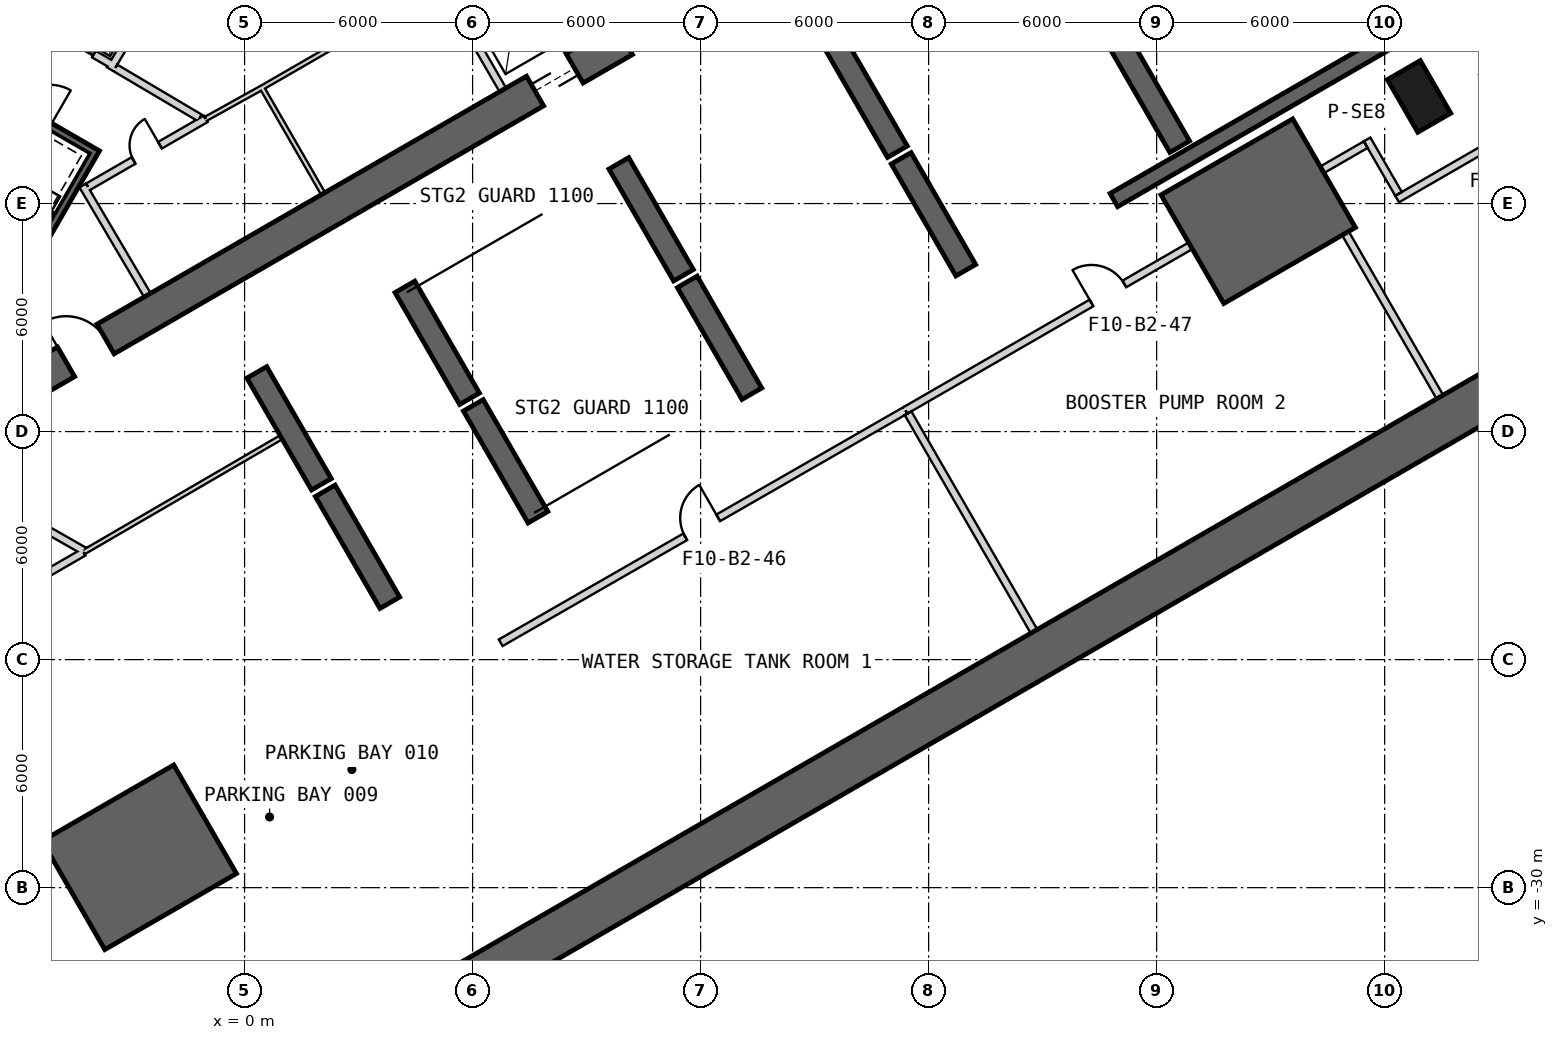
"""IFC4 building model, lengths in metres.
Left out: names, types, materials, properties, quantities, classifications, styles, units other than length and angle.
Written with IfcOpenShell. Run it as: python <this file> out.ifc"""

import sys

from ifc_helpers import new_model, si_unit, direction, frame, frame_2d, origin, origin_2d, place, context, subcontext, project, spatial, polyline, rectangle, outline, extrude, element, fill, save


model = new_model("IFC4")
c1 = context("Model", 3, precision=1e-05, world=origin(), true_north=direction((0.0, 1.0)))
c2 = subcontext(c1, "Body", "Model", "MODEL_VIEW")
j1 = project(units=[si_unit("LENGTHUNIT", "METRE"), si_unit("PLANEANGLEUNIT", "RADIAN")], contexts=[c1])
p1 = place(None, origin())
s1 = spatial("IfcSite", under=j1, at=p1, CompositionType="ELEMENT")
p2 = place(p1, origin())
s2 = spatial("IfcBuilding", under=s1, at=p2, CompositionType="ELEMENT")
p3 = place(p2, frame((0.0, 0.0, -11.0)))
s3 = spatial("IfcBuildingStorey", under=s2, at=p3, CompositionType="ELEMENT", Elevation=-11.0)
p4 = place(p3, frame((33.458, -16.625, -0.4), z_axis=(0.0, 0.0, 1.0), x_axis=(-0.865989988988, -0.500061335211, 0.0)))
e1 = element("IfcWall", 1, at=p4, inside=s3, PredefinedType="SHEAR", context=c2, shape_type="SweptSolid", body=[
    extrude(rectangle(XDim=41.324, YDim=1.2, at=frame_2d((20.662, 0.0))), origin(), (0.0, 0.0, 1.0), 5.9),
])
p5 = place(p3, frame((30.905, -9.181, -0.4), z_axis=(0.0, 0.0, 1.0), x_axis=(0.5, -0.866025403784, 0.0)))
e2 = element("IfcColumn", 2, at=p5, inside=s3, PredefinedType="COLUMN", context=c2, shape_type="SweptSolid", body=[
    extrude(rectangle(XDim=1.6, YDim=1.0, at=origin_2d()), origin(), (0.0, 0.0, 1.0), 5.9),
])
p6 = place(p3, frame((-7.825, -17.97, -0.4), z_axis=(0.0, 0.0, 1.0), x_axis=(0.866028369851, 0.499994862586, 0.0)))
e3 = element("IfcWall", 3, at=p6, inside=s3, PredefinedType="SHEAR", context=c2, shape_type="SweptSolid", body=[
    extrude(rectangle(XDim=31.523, YDim=0.9, at=frame_2d((15.762, 0.0))), origin(), (0.0, 0.0, 1.0), 5.9),
])
p7 = place(p6, frame((17.862, 0.0, 0.4)))
e4 = element("IfcOpeningElement", 4, at=p7, cuts=e3, PredefinedType="OPENING", context=c2, shape_type="SweptSolid", body=[
    extrude(rectangle(XDim=1.2, YDim=2.4, at=frame_2d((0.6, 1.2))), frame((0.0, 0.46, 0.0), z_axis=(0.0, -1.0, 0.0), x_axis=(1.0, 0.0, 0.0)), (0.0, 0.0, 1.0), 0.92),
])
p8 = place(p6, frame((20.562, 0.0, 0.4)))
e5 = element("IfcOpeningElement", 5, at=p8, cuts=e3, PredefinedType="OPENING", context=c2, shape_type="SweptSolid", body=[
    extrude(rectangle(XDim=1.2, YDim=2.4, at=frame_2d((0.6, 1.2))), frame((0.0, 0.46, 0.0), z_axis=(0.0, -1.0, 0.0), x_axis=(1.0, 0.0, 0.0)), (0.0, 0.0, 1.0), 0.92),
])
p9 = place(p6, frame((26.712, 0.0, 0.4)))
e6 = element("IfcOpeningElement", 6, at=p9, cuts=e3, PredefinedType="OPENING", context=c2, shape_type="SweptSolid", body=[
    extrude(rectangle(XDim=1.2, YDim=2.4, at=frame_2d((0.6, 1.2))), frame((0.0, 0.46, 0.0), z_axis=(0.0, -1.0, 0.0), x_axis=(1.0, 0.0, 0.0)), (0.0, 0.0, 1.0), 0.92),
])
p10 = place(p6, frame((3.612, 0.0, 0.4)))
e7 = element("IfcOpeningElement", 7, at=p10, cuts=e3, PredefinedType="OPENING", context=c2, shape_type="SweptSolid", body=[
    extrude(rectangle(XDim=1.2, YDim=2.4, at=frame_2d((0.6, 1.2))), frame((0.0, 0.46, 0.0), z_axis=(0.0, -1.0, 0.0), x_axis=(1.0, 0.0, 0.0)), (0.0, 0.0, 1.0), 0.92),
])
p11 = place(p3, frame((15.478, -7.692, -0.4), z_axis=(0.0, 0.0, 1.0), x_axis=(0.499977295307, -0.866038511948, 0.0)))
e8 = element("IfcWall", 8, at=p11, inside=s3, PredefinedType="STANDARD", context=c2, shape_type="SweptSolid", body=[
    extrude(rectangle(XDim=3.4, YDim=0.6, at=frame_2d((1.7, 0.0))), origin(), (0.0, 0.0, 1.0), 3.164),
])
p12 = place(p3, frame((9.848, -10.942, -0.4), z_axis=(0.0, 0.0, 1.0), x_axis=(0.499977295307, -0.866038511948, 0.0)))
e9 = element("IfcWall", 9, at=p12, inside=s3, PredefinedType="STANDARD", context=c2, shape_type="SweptSolid", body=[
    extrude(rectangle(XDim=3.4, YDim=0.6, at=frame_2d((1.7, 0.0))), origin(), (0.0, 0.0, 1.0), 4.093),
])
p13 = place(p3, frame((4.219, -14.192, -0.4), z_axis=(0.0, 0.0, 1.0), x_axis=(0.499977295307, -0.866038511948, 0.0)))
e10 = element("IfcWall", 10, at=p13, inside=s3, PredefinedType="STANDARD", context=c2, shape_type="SweptSolid", body=[
    extrude(rectangle(XDim=3.4, YDim=0.6, at=frame_2d((1.7, 0.0))), origin(), (0.0, 0.0, 1.0), 5.021),
])
p14 = place(p3, frame((0.322, -16.442, -0.4), z_axis=(0.0, 0.0, 1.0), x_axis=(0.500062241894, -0.865989465428, 0.0)))
e11 = element("IfcWall", 11, at=p14, inside=s3, PredefinedType="STANDARD", context=c2, shape_type="SweptSolid", body=[
    extrude(rectangle(XDim=3.4, YDim=0.6, at=frame_2d((1.7, 0.0))), origin(), (0.0, 0.0, 1.0), 5.45),
])
p15 = place(p3, frame((22.907, -7.559, -0.4), z_axis=(0.0, 0.0, 1.0), x_axis=(0.499977295307, -0.866038511948, 0.0)))
e12 = element("IfcWall", 12, at=p15, inside=s3, PredefinedType="STANDARD", context=c2, shape_type="SweptSolid", body=[
    extrude(rectangle(XDim=3.4, YDim=0.6, at=frame_2d((1.7, 0.0))), origin(), (0.0, 0.0, 1.0), 2.236),
])
p16 = place(p3, frame((17.278, -10.809, -0.4), z_axis=(0.0, 0.0, 1.0), x_axis=(0.499977295307, -0.866038511948, 0.0)))
e13 = element("IfcWall", 13, at=p16, inside=s3, PredefinedType="STANDARD", context=c2, shape_type="SweptSolid", body=[
    extrude(rectangle(XDim=3.4, YDim=0.6, at=frame_2d((1.7, 0.0))), origin(), (0.0, 0.0, 1.0), 3.164),
])
p17 = place(p3, frame((11.648, -14.059, -0.4), z_axis=(0.0, 0.0, 1.0), x_axis=(0.499977295307, -0.866038511948, 0.0)))
e14 = element("IfcWall", 14, at=p17, inside=s3, PredefinedType="STANDARD", context=c2, shape_type="SweptSolid", body=[
    extrude(rectangle(XDim=3.4, YDim=0.6, at=frame_2d((1.7, 0.0))), origin(), (0.0, 0.0, 1.0), 4.093),
])
p18 = place(p3, frame((6.019, -17.309, -0.4), z_axis=(0.0, 0.0, 1.0), x_axis=(0.499977295307, -0.866038511948, 0.0)))
e15 = element("IfcWall", 15, at=p18, inside=s3, PredefinedType="STANDARD", context=c2, shape_type="SweptSolid", body=[
    extrude(rectangle(XDim=3.4, YDim=0.6, at=frame_2d((1.7, 0.0))), origin(), (0.0, 0.0, 1.0), 5.021),
])
p19 = place(p3, frame((2.122, -19.559, -0.4), z_axis=(0.0, 0.0, 1.0), x_axis=(0.499977295307, -0.866038511948, 0.0)))
e16 = element("IfcWall", 16, at=p19, inside=s3, PredefinedType="STANDARD", context=c2, shape_type="SweptSolid", body=[
    extrude(rectangle(XDim=3.4, YDim=0.6, at=frame_2d((1.7, 0.0))), origin(), (0.0, 0.0, 1.0), 5.45),
])
p20 = place(p3, frame((22.875, -11.908, -0.4), z_axis=(0.0, 0.0, 1.0), x_axis=(0.866022361258, 0.500005269773, 0.0)))
e17 = element("IfcWall", 17, at=p20, inside=s3, PredefinedType="SHEAR", context=c2, shape_type="SweptSolid", body=[
    extrude(rectangle(XDim=19.702, YDim=0.4, at=frame_2d((9.851, 0.0))), origin(), (0.0, 0.0, 1.0), 5.5),
])
p21 = place(p3, frame((0.0, 0.0, -0.4)))
e18 = element("IfcWall", 18, at=p21, inside=s3, PredefinedType="SHEAR", context=c2, shape_type="SweptSolid", body=[
    extrude(outline(polyline([(-3.678, -31.63), (-0.214, -29.63), (-1.864, -26.772), (-5.328, -28.772), (-3.678, -31.63)])), origin(), (0.0, 0.0, 1.0), 5.9),
])
p22 = place(p3, frame((0.0, 0.0, -0.4)))
e19 = element("IfcWall", 19, at=p22, inside=s3, PredefinedType="SHEAR", context=c2, shape_type="SweptSolid", body=[
    extrude(outline(polyline([(25.767, -14.63), (29.231, -12.63), (27.581, -9.772), (24.117, -11.772), (25.767, -14.63)])), origin(), (0.0, 0.0, 1.0), 5.9),
])
p23 = place(p3, frame((6.795, -9.01, 0.0), z_axis=(0.0, 0.0, 1.0), x_axis=(-0.499984717929, 0.866034226713, 0.0)))
e20 = element("IfcWall", 20, at=p23, inside=s3, PredefinedType="PLUMBINGWALL", context=c2, shape_type="SweptSolid", body=[
    extrude(rectangle(XDim=3.25, YDim=0.2, at=frame_2d((1.625, 0.0))), origin(), (0.0, 0.0, 1.0), 5.1),
])
p24 = place(p3, frame((-3.905, -10.563, -0.4), z_axis=(0.0, 0.0, 1.0), x_axis=(-0.500012932018, -0.866017937352, 0.0)))
e21 = element("IfcWall", 21, at=p24, inside=s3, PredefinedType="SHEAR", context=c2, shape_type="SweptSolid", body=[
    extrude(rectangle(XDim=8.1, YDim=0.2, at=frame_2d((4.05, 0.0))), origin(), (0.0, 0.0, 1.0), 5.5),
])
p25 = place(p3, frame((-4.041, -10.599, -0.4), z_axis=(0.0, 0.0, 1.0), x_axis=(-0.866047807691, 0.499961193289, 0.0)))
e22 = element("IfcWall", 22, at=p25, inside=s3, PredefinedType="SHEAR", context=c2, shape_type="SweptSolid", body=[
    extrude(rectangle(XDim=3.6, YDim=0.2, at=frame_2d((1.8, 0.0))), origin(), (0.0, 0.0, 1.0), 5.5),
])
p26 = place(p25, frame((1.25, 0.0, 0.4)))
e23 = element("IfcOpeningElement", 23, at=p26, cuts=e22, PredefinedType="OPENING", context=c2, shape_type="SweptSolid", body=[
    extrude(rectangle(XDim=1.1, YDim=2.1, at=frame_2d((0.55, 1.05))), frame((0.0, 0.11, 0.0), z_axis=(0.0, -1.0, 0.0), x_axis=(1.0, 0.0, 0.0)), (0.0, 0.0, 1.0), 0.22),
])
p27 = place(p3, frame((-3.446, -8.368, 0.0), z_axis=(0.0, 0.0, 1.0), x_axis=(-0.866024647952, 0.500001309137, 0.0)))
e24 = element("IfcWall", 24, at=p27, inside=s3, PredefinedType="PLUMBINGWALL", context=c2, shape_type="SweptSolid", body=[
    extrude(rectangle(XDim=2.4, YDim=0.2, at=frame_2d((1.2, 0.0))), origin(), (0.0, 0.0, 1.0), 5.1),
])
p28 = place(p27, frame((0.6, 0.0, 0.0)))
e25 = element("IfcOpeningElement", 25, at=p28, cuts=e24, PredefinedType="OPENING", context=c2, shape_type="SweptSolid", body=[
    extrude(rectangle(XDim=1.2, YDim=2.4, at=frame_2d((0.6, 1.2))), frame((0.0, 0.11, 0.0), z_axis=(0.0, -1.0, 0.0), x_axis=(1.0, 0.0, 0.0)), (0.0, 0.0, 1.0), 0.22),
])
p29 = place(p3, frame((-1.91, -5.71, 0.0), z_axis=(0.0, 0.0, 1.0), x_axis=(-0.508616218331, -0.860993346345, 0.0)))
e26 = element("IfcWall", 26, at=p29, inside=s3, PredefinedType="PLUMBINGWALL", context=c2, shape_type="SweptSolid", body=[
    extrude(rectangle(XDim=3.2, YDim=0.2, at=frame_2d((1.6, 0.0))), origin(), (0.0, 0.0, 1.0), 5.1),
])
p30 = place(p3, frame((2.067, -11.74, 0.0), z_axis=(0.0, 0.0, 1.0), x_axis=(-0.499984717929, 0.866034226713, 0.0)))
e27 = element("IfcWall", 27, at=p30, inside=s3, PredefinedType="PARTITIONING", context=c2, shape_type="SweptSolid", body=[
    extrude(rectangle(XDim=3.25, YDim=0.12, at=frame_2d((1.625, 0.0))), origin(), (0.0, 0.0, 1.0), 5.1),
])
p31 = place(p3, frame((-4.26, -11.524, 0.0), z_axis=(0.0, 0.0, 1.0), x_axis=(0.507997497166, -0.861358544901, 0.0)))
e28 = element("IfcWall", 28, at=p31, inside=s3, PredefinedType="PARTITIONING", context=c2, shape_type="SweptSolid", body=[
    extrude(rectangle(XDim=3.35, YDim=0.2, at=frame_2d((1.675, 0.0))), origin(), (0.0, 0.0, 1.0), 5.1),
])
p32 = place(p3, frame((-1.024, -9.771, 0.0), z_axis=(0.0, 0.0, 1.0), x_axis=(-0.866029903013, -0.499992207027, 0.0)))
e29 = element("IfcWall", 29, at=p32, inside=s3, PredefinedType="PARTITIONING", context=c2, shape_type="SweptSolid", body=[
    extrude(rectangle(XDim=3.578, YDim=0.2, at=frame_2d((1.789, 0.0))), origin(), (0.0, 0.0, 1.0), 5.1),
])
p33 = place(p32, frame((1.389, 0.0, 0.0)))
e30 = element("IfcOpeningElement", 30, at=p33, cuts=e29, PredefinedType="OPENING", context=c2, shape_type="SweptSolid", body=[
    extrude(rectangle(XDim=0.8, YDim=2.1, at=frame_2d((0.4, 1.05))), frame((0.0, 0.11, 0.0), z_axis=(0.0, -1.0, 0.0), x_axis=(1.0, 0.0, 0.0)), (0.0, 0.0, 1.0), 0.22),
])
p34 = place(p3, frame((-1.023, -9.772, 0.0), z_axis=(0.0, 0.0, 1.0), x_axis=(0.874290944206, 0.485402250592, 0.0)))
e31 = element("IfcWall", 31, at=p34, inside=s3, PredefinedType="PARTITIONING", context=c2, shape_type="SweptSolid", body=[
    extrude(rectangle(XDim=1.723, YDim=0.12, at=frame_2d((0.861, 0.0))), origin(), (0.0, 0.0, 1.0), 5.1),
])
p35 = place(p3, frame((0.483, -8.936, 0.0), z_axis=(0.0, 0.0, 1.0), x_axis=(0.866028230842, 0.499995103361, 0.0)))
e32 = element("IfcWall", 32, at=p35, inside=s3, PredefinedType="PARTITIONING", context=c2, shape_type="SweptSolid", body=[
    extrude(rectangle(XDim=5.4, YDim=0.12, at=frame_2d((2.7, 0.0))), origin(), (0.0, 0.0, 1.0), 5.1),
])
p36 = place(p35, frame((2.3, 0.0, 0.0)))
e33 = element("IfcOpeningElement", 33, at=p36, cuts=e32, PredefinedType="OPENING", context=c2, shape_type="SweptSolid", body=[
    extrude(rectangle(XDim=0.8, YDim=2.1, at=frame_2d((0.4, 1.05))), frame((0.0, 0.07, 0.0), z_axis=(0.0, -1.0, 0.0), x_axis=(1.0, 0.0, 0.0)), (0.0, 0.0, 1.0), 0.14),
])
p37 = place(p3, frame((-3.401, -8.43, 0.0), z_axis=(0.0, 0.0, 1.0), x_axis=(0.860630814782, -0.509229418482, 0.0)))
e34 = element("IfcWall", 34, at=p37, inside=s3, PredefinedType="PARTITIONING", context=c2, shape_type="SweptSolid", body=[
    extrude(rectangle(XDim=2.582, YDim=0.2, at=frame_2d((1.291, 0.0))), origin(), (0.0, 0.0, 1.0), 5.1),
])
p38 = place(p3, frame((-4.236, -21.175, 0.0), z_axis=(0.0, 0.0, 1.0), x_axis=(0.864433297723, 0.502747524895, 0.0)))
e35 = element("IfcWall", 35, at=p38, inside=s3, PredefinedType="PARTITIONING", context=c2, shape_type="SweptSolid", body=[
    extrude(rectangle(XDim=6.244, YDim=0.12, at=frame_2d((3.122, 0.0))), origin(), (0.0, 0.0, 1.0), 4.68),
])
p39 = place(p3, frame((-11.05, -25.109, 0.0), z_axis=(0.0, 0.0, 1.0), x_axis=(0.866021255939, 0.50000718421, 0.0)))
e36 = element("IfcWall", 36, at=p39, inside=s3, PredefinedType="PARTITIONING", context=c2, shape_type="SweptSolid", body=[
    extrude(rectangle(XDim=7.868, YDim=0.2, at=frame_2d((3.934, 0.0))), origin(), (0.0, 0.0, 1.0), 4.18),
])
p40 = place(p39, frame((3.462, 0.0, 0.0)))
e37 = element("IfcOpeningElement", 37, at=p40, cuts=e36, PredefinedType="OPENING", context=c2, shape_type="SweptSolid", body=[
    extrude(rectangle(XDim=1.0, YDim=2.1, at=frame_2d((0.5, 1.05))), frame((0.0, 0.11, 0.0), z_axis=(0.0, -1.0, 0.0), x_axis=(1.0, 0.0, 0.0)), (0.0, 0.0, 1.0), 0.22),
])
p41 = place(p3, frame((-8.707, -18.583, 0.0), z_axis=(0.0, 0.0, 1.0), x_axis=(0.868530929613, -0.495634970825, 0.0)))
e38 = element("IfcWall", 38, at=p41, inside=s3, PredefinedType="PARTITIONING", context=c2, shape_type="SweptSolid", body=[
    extrude(rectangle(XDim=5.166, YDim=0.2, at=frame_2d((2.583, 0.0))), origin(), (0.0, 0.0, 1.0), 4.18),
])
p42 = place(p3, frame((6.739, -23.556, 0.0), z_axis=(0.0, 0.0, 1.0), x_axis=(0.867232277188, 0.497903783279, 0.0)))
e39 = element("IfcWall", 39, at=p42, inside=s3, PredefinedType="PARTITIONING", context=c2, shape_type="SweptSolid", body=[
    extrude(rectangle(XDim=12.283, YDim=0.2, at=frame_2d((6.142, 0.0))), origin(), (0.0, 0.0, 1.0), 5.1),
])
p43 = place(p42, frame((5.6, 0.0, 0.0)))
e40 = element("IfcOpeningElement", 40, at=p43, cuts=e39, PredefinedType="OPENING", context=c2, shape_type="SweptSolid", body=[
    extrude(rectangle(XDim=1.0, YDim=2.1, at=frame_2d((0.5, 1.05))), frame((0.0, 0.11, 0.0), z_axis=(0.0, -1.0, 0.0), x_axis=(1.0, 0.0, 0.0)), (0.0, 0.0, 1.0), 0.22),
])
p44 = place(p3, frame((17.392, -17.441, 0.0), z_axis=(0.0, 0.0, 1.0), x_axis=(0.866022182542, 0.500005579313, 0.0)))
e41 = element("IfcWall", 41, at=p44, inside=s3, PredefinedType="PARTITIONING", context=c2, shape_type="SweptSolid", body=[
    extrude(rectangle(XDim=8.659, YDim=0.2, at=frame_2d((4.329, 0.0))), origin(), (0.0, 0.0, 1.0), 5.1),
])
p45 = place(p44, frame((5.65, 0.0, 0.0)))
e42 = element("IfcOpeningElement", 42, at=p45, cuts=e41, PredefinedType="OPENING", context=c2, shape_type="SweptSolid", body=[
    extrude(rectangle(XDim=1.0, YDim=2.1, at=frame_2d((0.5, 1.05))), frame((0.0, 0.11, 0.0), z_axis=(0.0, -1.0, 0.0), x_axis=(1.0, 0.0, 0.0)), (0.0, 0.0, 1.0), 0.22),
])
p46 = place(p3, frame((28.354, -11.111, 0.0), z_axis=(0.0, 0.0, 1.0), x_axis=(0.866056658381, 0.499945861543, 0.0)))
e43 = element("IfcWall", 43, at=p46, inside=s3, PredefinedType="PARTITIONING", context=c2, shape_type="SweptSolid", body=[
    extrude(rectangle(XDim=1.324, YDim=0.2, at=frame_2d((0.662, 0.0))), origin(), (0.0, 0.0, 1.0), 5.1),
])
p47 = place(p3, frame((30.328, -11.881, 0.0), z_axis=(0.0, 0.0, 1.0), x_axis=(0.866019471182, 0.500010275428, 0.0)))
e44 = element("IfcWall", 44, at=p47, inside=s3, PredefinedType="PARTITIONING", context=c2, shape_type="SweptSolid", body=[
    extrude(rectangle(XDim=3.5, YDim=0.2, at=frame_2d((1.75, 0.0))), origin(), (0.0, 0.0, 1.0), 5.1),
])
p48 = place(p3, frame((30.365, -11.745, 0.0), z_axis=(0.0, 0.0, 1.0), x_axis=(-0.499918423778, 0.866072496716, 0.0)))
e45 = element("IfcWall", 45, at=p48, inside=s3, PredefinedType="PARTITIONING", context=c2, shape_type="SweptSolid", body=[
    extrude(rectangle(XDim=1.654, YDim=0.2, at=frame_2d((0.827, 0.0))), origin(), (0.0, 0.0, 1.0), 5.1),
])
p49 = place(p3, frame((20.773, -23.257, 0.0), z_axis=(0.0, 0.0, 1.0), x_axis=(-0.499997729706, 0.866026714536, 0.0)))
e46 = element("IfcWall", 46, at=p49, inside=s3, PredefinedType="PARTITIONING", context=c2, shape_type="SweptSolid", body=[
    extrude(rectangle(XDim=6.628, YDim=0.2, at=frame_2d((3.314, 0.0))), origin(), (0.0, 0.0, 1.0), 5.1),
])
p50 = place(p3, frame((31.454, -17.09, 0.0), z_axis=(0.0, 0.0, 1.0), x_axis=(-0.49999297576, 0.866029459193, 0.0)))
e47 = element("IfcWall", 47, at=p50, inside=s3, PredefinedType="PARTITIONING", context=c2, shape_type="SweptSolid", body=[
    extrude(rectangle(XDim=4.974, YDim=0.2, at=frame_2d((2.487, 0.0))), origin(), (0.0, 0.0, 1.0), 5.1),
])
p51 = place(p28, origin())
e48 = element("IfcDoor", 48, at=p51, inside=s3, OperationType="SLIDING_TO_LEFT", PredefinedType="USERDEFINED", context=c2, shape_type="SweptSolid", body=[
    extrude(rectangle(XDim=1.2, YDim=2.4, at=frame_2d((0.6, 1.2))), frame((0.0, 0.025, 0.0), z_axis=(0.0, -1.0, 0.0), x_axis=(1.0, 0.0, 0.0)), (0.0, 0.0, 1.0), 0.05),
])
fill(e25, e48)
p52 = place(p33, origin())
e49 = element("IfcDoor", 49, at=p52, inside=s3, OperationType="SINGLE_SWING_LEFT", PredefinedType="USERDEFINED", context=c2, shape_type="SweptSolid", body=[
    extrude(rectangle(XDim=0.8, YDim=2.1, at=frame_2d((0.4, 1.05))), frame((0.0, 0.025, 0.0), z_axis=(0.0, -1.0, 0.0), x_axis=(1.0, 0.0, 0.0)), (0.0, 0.0, 1.0), 0.05),
])
fill(e30, e49)
p53 = place(p43, origin())
e50 = element("IfcDoor", 50, at=p53, inside=s3, OperationType="SINGLE_SWING_RIGHT", PredefinedType="USERDEFINED", context=c2, shape_type="SweptSolid", body=[
    extrude(rectangle(XDim=1.0, YDim=2.1, at=frame_2d((0.5, 1.05))), frame((0.0, 0.025, 0.0), z_axis=(0.0, -1.0, 0.0), x_axis=(1.0, 0.0, 0.0)), (0.0, 0.0, 1.0), 0.05),
])
fill(e40, e50)
p54 = place(p45, origin())
e51 = element("IfcDoor", 51, at=p54, inside=s3, OperationType="SINGLE_SWING_LEFT", PredefinedType="USERDEFINED", context=c2, shape_type="SweptSolid", body=[
    extrude(rectangle(XDim=1.0, YDim=2.1, at=frame_2d((0.5, 1.05))), frame((0.0, 0.025, 0.0), z_axis=(0.0, -1.0, 0.0), x_axis=(1.0, 0.0, 0.0)), (0.0, 0.0, 1.0), 0.05),
])
fill(e42, e51)
p55 = place(p7, origin())
e52 = element("IfcDoor", 52, at=p55, inside=s3, OperationType="SLIDING_TO_LEFT", PredefinedType="USERDEFINED", context=c2, shape_type="SweptSolid", body=[
    extrude(rectangle(XDim=1.2, YDim=2.4, at=frame_2d((0.6, 1.2))), frame((0.0, 0.025, 0.0), z_axis=(0.0, -1.0, 0.0), x_axis=(1.0, 0.0, 0.0)), (0.0, 0.0, 1.0), 0.05),
])
fill(e4, e52)
p56 = place(p10, origin())
e53 = element("IfcDoor", 53, at=p56, inside=s3, OperationType="SINGLE_SWING_LEFT", PredefinedType="USERDEFINED", context=c2, shape_type="SweptSolid", body=[
    extrude(rectangle(XDim=1.2, YDim=2.4, at=frame_2d((0.6, 1.2))), frame((0.0, 0.025, 0.0), z_axis=(0.0, -1.0, 0.0), x_axis=(1.0, 0.0, 0.0)), (0.0, 0.0, 1.0), 0.05),
])
fill(e7, e53)
save(model, sys.argv[1])
